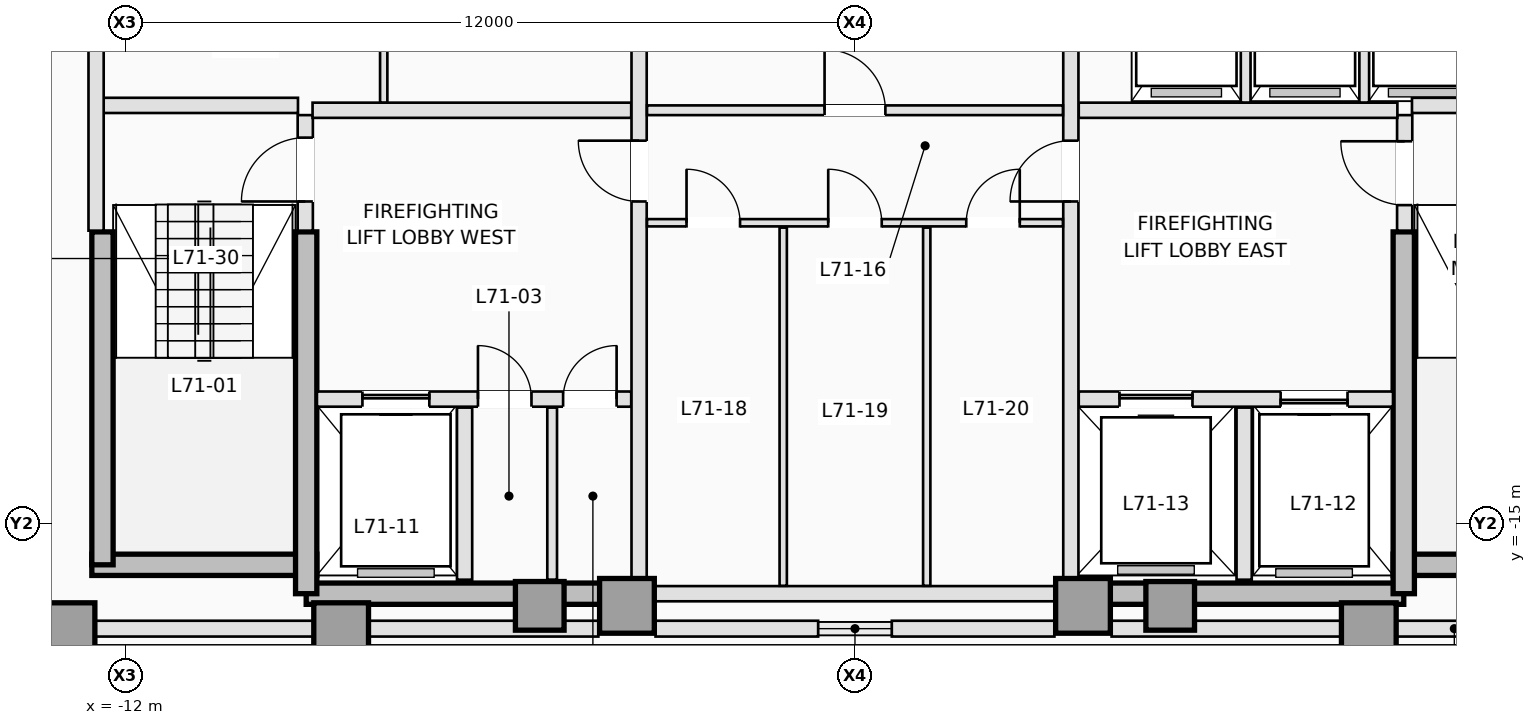
"""IFC4 building model, lengths in metres.
Left out: names, types, materials, properties, quantities, classifications, styles, units other than length and angle.
Written with IfcOpenShell. Run it as: python <this file> out.ifc"""

import sys

from ifc_helpers import new_model, si_unit, direction, frame, frame_2d, origin, origin_2d, place, context, subcontext, project, spatial, rectangle, extrude, element, fill, save


model = new_model("IFC4")
c1 = context("Model", 3, precision=1e-05, world=origin(), true_north=direction((0.0, 1.0)))
c2 = subcontext(c1, "Body", "Model", "MODEL_VIEW")
j1 = project(units=[si_unit("LENGTHUNIT", "METRE"), si_unit("PLANEANGLEUNIT", "RADIAN")], contexts=[c1])
p1 = place(None, origin())
s1 = spatial("IfcSite", under=j1, at=p1, CompositionType="ELEMENT")
p2 = place(p1, origin())
s2 = spatial("IfcBuilding", under=s1, at=p2, CompositionType="ELEMENT")
p3 = place(p2, frame((0.0, 0.0, 256.9)))
s3 = spatial("IfcBuildingStorey", under=s2, at=p3, CompositionType="ELEMENT", Elevation=256.9)
p4 = place(p3, frame((-12.55, -15.675, 0.0), z_axis=(0.0, 0.0, 1.0), x_axis=(1.0, 0.0, 0.0)))
e1 = element("IfcWall", 1, at=p4, inside=s3, PredefinedType="SHEAR", context=c2, shape_type="SweptSolid", body=[
    extrude(rectangle(XDim=3.7, YDim=0.35, at=frame_2d((1.85, 0.0))), origin(), (0.0, 0.0, 1.0), 3.5),
])
for number, where, z_axis, x_axis in (
    (2, (-9.025, -16.15, 0.0), (0.0, 0.0, 1.0), (1.0, 0.0, 0.0)),
    (3, (3.75, -16.15, 0.0), (0.0, 0.0, 1.0), (1.0, 0.0, 0.0)),
):
    element("IfcWall", number, at=place(p3, frame(where, z_axis=z_axis, x_axis=x_axis)), inside=s3, PredefinedType="SHEAR", context=c2, shape_type="SweptSolid", body=[
        extrude(rectangle(XDim=5.275, YDim=0.35, at=frame_2d((2.637, 0.0))), origin(), (0.0, 0.0, 1.0), 3.5),
    ])
p5 = place(p3, frame((8.85, -15.675, 0.0), z_axis=(0.0, 0.0, 1.0), x_axis=(1.0, 0.0, 0.0)))
e4 = element("IfcWall", 4, at=p5, inside=s3, PredefinedType="SHEAR", context=c2, shape_type="SweptSolid", body=[
    extrude(rectangle(XDim=3.7, YDim=0.35, at=frame_2d((1.85, 0.0))), origin(), (0.0, 0.0, 1.0), 3.5),
])
p6 = place(p3, frame((-12.375, -15.675, 0.0), z_axis=(0.0, 0.0, 1.0), x_axis=(0.0, 1.0, 0.0)))
e5 = element("IfcWall", 5, at=p6, inside=s3, PredefinedType="SHEAR", context=c2, shape_type="SweptSolid", body=[
    extrude(rectangle(XDim=5.475, YDim=0.35, at=frame_2d((2.738, 0.0))), origin(), (0.0, 0.0, 1.0), 3.5),
])
for number, where, z_axis, x_axis in (
    (6, (-9.025, -16.15, 0.0), (0.0, 0.0, 1.0), (0.0, 1.0, 0.0)),
    (7, (9.025, -16.15, 0.0), (0.0, 0.0, 1.0), (0.0, 1.0, 0.0)),
):
    element("IfcWall", number, at=place(p3, frame(where, z_axis=z_axis, x_axis=x_axis)), inside=s3, PredefinedType="SHEAR", context=c2, shape_type="SweptSolid", body=[
        extrude(rectangle(XDim=5.95, YDim=0.35, at=frame_2d((2.975, 0.0))), origin(), (0.0, 0.0, 1.0), 3.5),
    ])
for number, where, z_axis, x_axis in (
    (8, (-12.95, -16.75, 0.0), (0.0, 0.0, 1.0), (1.0, 0.0, 0.0)),
    (9, (-8.45, -16.75, 0.0), (0.0, 0.0, 1.0), (1.0, 0.0, 0.0)),
    (10, (-3.75, -16.35, 0.0), (0.0, 0.0, 1.0), (1.0, 0.0, 0.0)),
    (11, (3.75, -16.35, 0.0), (0.0, 0.0, 1.0), (1.0, 0.0, 0.0)),
    (12, (8.45, -16.75, 0.0), (0.0, 0.0, 1.0), (1.0, 0.0, 0.0)),
):
    element("IfcColumn", number, at=place(p3, frame(where, z_axis=z_axis, x_axis=x_axis)), inside=s3, PredefinedType="COLUMN", context=c2, shape_type="SweptSolid", body=[
        extrude(rectangle(XDim=0.9, YDim=0.9, at=origin_2d()), origin(), (0.0, 0.0, 1.0), 3.5),
    ])
for number, where, z_axis, x_axis in (
    (13, (-5.184, -16.35, 0.0), (0.0, 0.0, 1.0), (0.0, 1.0, 0.0)),
    (14, (5.184, -16.35, 0.0), (0.0, 0.0, 1.0), (0.0, 1.0, 0.0)),
):
    element("IfcColumn", number, at=place(p3, frame(where, z_axis=z_axis, x_axis=x_axis)), inside=s3, PredefinedType="COLUMN", context=c2, shape_type="SweptSolid", body=[
        extrude(rectangle(XDim=0.8, YDim=0.8, at=origin_2d()), origin(), (0.0, 0.0, 1.0), 3.5),
    ])
for number, where, z_axis, x_axis in (
    (15, (15.493, -16.725, 0.0), (0.0, 0.0, 1.0), (-1.0, 0.0, 0.0)),
    (16, (-4.22, -16.725, 0.0), (0.0, 0.0, 1.0), (-1.0, 0.0, 0.0)),
):
    element("IfcWall", number, at=place(p3, frame(where, z_axis=z_axis, x_axis=x_axis)), inside=s3, PredefinedType="STANDARD", context=c2, shape_type="SweptSolid", body=[
        extrude(rectangle(XDim=11.273, YDim=0.26, at=frame_2d((5.636, 0.0))), origin(), (0.0, 0.0, 1.0), 2.79),
    ])
for number, where, z_axis, x_axis in (
    (17, (3.28, -16.725, 0.0), (0.0, 0.0, 1.0), (-1.0, 0.0, 0.0)),
    (18, (-0.606, -16.725, 0.0), (0.0, 0.0, 1.0), (-1.0, 0.0, 0.0)),
):
    element("IfcWall", number, at=place(p3, frame(where, z_axis=z_axis, x_axis=x_axis)), inside=s3, PredefinedType="STANDARD", context=c2, shape_type="SweptSolid", body=[
        extrude(rectangle(XDim=2.674, YDim=0.26, at=frame_2d((1.337, 0.0))), origin(), (0.0, 0.0, 1.0), 3.25),
    ])
p7 = place(p3, frame((-9.04, -10.18, 0.0), z_axis=(0.0, 0.0, 1.0), x_axis=(0.0, 1.0, 0.0)))
e19 = element("IfcWall", 19, at=p7, inside=s3, PredefinedType="PARTITIONING", context=c2, shape_type="SweptSolid", body=[
    extrude(rectangle(XDim=1.9, YDim=0.25, at=frame_2d((0.95, 0.0))), origin(), (0.0, 0.0, 1.0), 3.25),
])
p8 = place(p7, frame((0.48, 0.0, 0.0)))
e20 = element("IfcOpeningElement", 20, at=p8, cuts=e19, PredefinedType="OPENING", context=c2, shape_type="SweptSolid", body=[
    extrude(rectangle(XDim=1.05, YDim=2.15, at=frame_2d((0.525, 1.075))), frame((0.0, 0.135, 0.0), z_axis=(0.0, -1.0, 0.0), x_axis=(1.0, 0.0, 0.0)), (0.0, 0.0, 1.0), 0.27),
])
p9 = place(p3, frame((9.04, -10.18, 0.0), z_axis=(0.0, 0.0, 1.0), x_axis=(0.0, 1.0, 0.0)))
e21 = element("IfcWall", 21, at=p9, inside=s3, PredefinedType="PARTITIONING", context=c2, shape_type="SweptSolid", body=[
    extrude(rectangle(XDim=1.9, YDim=0.25, at=frame_2d((0.95, 0.0))), origin(), (0.0, 0.0, 1.0), 3.25),
])
p10 = place(p9, frame((0.42, 0.0, 0.0)))
e22 = element("IfcOpeningElement", 22, at=p10, cuts=e21, PredefinedType="OPENING", context=c2, shape_type="SweptSolid", body=[
    extrude(rectangle(XDim=1.05, YDim=2.15, at=frame_2d((0.525, 1.075))), frame((0.0, 0.135, 0.0), z_axis=(0.0, -1.0, 0.0), x_axis=(1.0, 0.0, 0.0)), (0.0, 0.0, 1.0), 0.27),
])
for number, where, z_axis, x_axis in (
    (23, (-12.38, -8.12, 0.0), (0.0, 0.0, 1.0), (1.0, 0.0, 0.0)),
    (24, (9.16, -8.12, 0.0), (0.0, 0.0, 1.0), (1.0, 0.0, 0.0)),
):
    element("IfcWall", number, at=place(p3, frame(where, z_axis=z_axis, x_axis=x_axis)), inside=s3, PredefinedType="PARTITIONING", context=c2, shape_type="SweptSolid", body=[
        extrude(rectangle(XDim=3.22, YDim=0.25, at=frame_2d((1.61, 0.0))), origin(), (0.0, 0.0, 1.0), 3.25),
    ])
p11 = place(p3, frame((-12.48, -10.18, 0.0), z_axis=(0.0, 0.0, 1.0), x_axis=(0.0, 1.0, 0.0)))
e25 = element("IfcWall", 25, at=p11, inside=s3, PredefinedType="PARTITIONING", context=c2, shape_type="SweptSolid", body=[
    extrude(rectangle(XDim=4.84, YDim=0.25, at=frame_2d((2.42, 0.0))), origin(), (0.0, 0.0, 1.0), 3.25),
])
p12 = place(p3, frame((-8.848, -12.95, 0.0), z_axis=(0.0, 0.0, 1.0), x_axis=(1.0, 0.0, 0.0)))
e26 = element("IfcWall", 26, at=p12, inside=s3, PredefinedType="PARTITIONING", context=c2, shape_type="SweptSolid", body=[
    extrude(rectangle(XDim=5.168, YDim=0.25, at=frame_2d((2.584, 0.0))), origin(), (0.0, 0.0, 1.0), 3.25),
])
p13 = place(p12, frame((0.748, 0.0, 0.0)))
e27 = element("IfcOpeningElement", 27, at=p13, cuts=e26, PredefinedType="OPENING", context=c2, shape_type="SweptSolid", body=[
    extrude(rectangle(XDim=1.1, YDim=2.15, at=frame_2d((0.55, 1.075))), frame((0.0, 0.135, 0.0), z_axis=(0.0, -1.0, 0.0), x_axis=(1.0, 0.0, 0.0)), (0.0, 0.0, 1.0), 0.27),
])
p14 = place(p12, frame((2.648, 0.0, 0.0)))
e28 = element("IfcOpeningElement", 28, at=p14, cuts=e26, PredefinedType="OPENING", context=c2, shape_type="SweptSolid", body=[
    extrude(rectangle(XDim=0.88, YDim=2.1, at=frame_2d((0.44, 1.05))), frame((0.0, 0.135, 0.0), z_axis=(0.0, -1.0, 0.0), x_axis=(1.0, 0.0, 0.0)), (0.0, 0.0, 1.0), 0.27),
])
p15 = place(p12, frame((4.048, 0.0, 0.0)))
e29 = element("IfcOpeningElement", 29, at=p15, cuts=e26, PredefinedType="OPENING", context=c2, shape_type="SweptSolid", body=[
    extrude(rectangle(XDim=0.88, YDim=2.1, at=frame_2d((0.44, 1.05))), frame((0.0, 0.135, 0.0), z_axis=(0.0, -1.0, 0.0), x_axis=(1.0, 0.0, 0.0)), (0.0, 0.0, 1.0), 0.27),
])
p16 = place(p3, frame((3.68, -12.95, 0.0), z_axis=(0.0, 0.0, 1.0), x_axis=(1.0, 0.0, 0.0)))
e30 = element("IfcWall", 30, at=p16, inside=s3, PredefinedType="PARTITIONING", context=c2, shape_type="SweptSolid", body=[
    extrude(rectangle(XDim=5.168, YDim=0.25, at=frame_2d((2.584, 0.0))), origin(), (0.0, 0.0, 1.0), 3.25),
])
p17 = place(p16, frame((3.32, 0.0, 0.0)))
e31 = element("IfcOpeningElement", 31, at=p17, cuts=e30, PredefinedType="OPENING", context=c2, shape_type="SweptSolid", body=[
    extrude(rectangle(XDim=1.1, YDim=2.15, at=frame_2d((0.55, 1.075))), frame((0.0, 0.135, 0.0), z_axis=(0.0, -1.0, 0.0), x_axis=(1.0, 0.0, 0.0)), (0.0, 0.0, 1.0), 0.27),
])
p18 = place(p16, frame((0.67, 0.0, 0.0)))
e32 = element("IfcOpeningElement", 32, at=p18, cuts=e30, PredefinedType="OPENING", context=c2, shape_type="SweptSolid", body=[
    extrude(rectangle(XDim=1.2, YDim=2.15, at=frame_2d((0.6, 1.075))), frame((0.0, 0.135, 0.0), z_axis=(0.0, -1.0, 0.0), x_axis=(1.0, 0.0, 0.0)), (0.0, 0.0, 1.0), 0.27),
])
p19 = place(p3, frame((-6.42, -15.92, 0.0), z_axis=(0.0, 0.0, 1.0), x_axis=(0.0, 1.0, 0.0)))
e33 = element("IfcWall", 33, at=p19, inside=s3, PredefinedType="PARTITIONING", context=c2, shape_type="SweptSolid", body=[
    extrude(rectangle(XDim=2.83, YDim=0.25, at=frame_2d((1.415, 0.0))), origin(), (0.0, 0.0, 1.0), 3.25),
])
p20 = place(p3, frame((-4.98, -15.92, 0.0), z_axis=(0.0, 0.0, 1.0), x_axis=(0.0, 1.0, 0.0)))
e34 = element("IfcWall", 34, at=p20, inside=s3, PredefinedType="PARTITIONING", context=c2, shape_type="SweptSolid", body=[
    extrude(rectangle(XDim=2.83, YDim=0.16, at=frame_2d((1.415, 0.0))), origin(), (0.0, 0.0, 1.0), 3.25),
])
p21 = place(p3, frame((6.4, -15.92, 0.0), z_axis=(0.0, 0.0, 1.0), x_axis=(0.0, 1.0, 0.0)))
e35 = element("IfcWall", 35, at=p21, inside=s3, PredefinedType="PARTITIONING", context=c2, shape_type="SweptSolid", body=[
    extrude(rectangle(XDim=2.83, YDim=0.25, at=frame_2d((1.415, 0.0))), origin(), (0.0, 0.0, 1.0), 3.25),
])
for number, where, z_axis, x_axis in (
    (36, (-8.92, -8.2, 0.0), (0.0, 0.0, 1.0), (1.0, 0.0, 0.0)),
    (37, (3.68, -8.2, 0.0), (0.0, 0.0, 1.0), (1.0, 0.0, 0.0)),
):
    element("IfcWall", number, at=place(p3, frame(where, z_axis=z_axis, x_axis=x_axis)), inside=s3, PredefinedType="PARTITIONING", context=c2, shape_type="SweptSolid", body=[
        extrude(rectangle(XDim=5.24, YDim=0.25, at=frame_2d((2.62, 0.0))), origin(), (0.0, 0.0, 1.0), 3.25),
    ])
p22 = place(p3, frame((-3.55, -15.898, 0.0), z_axis=(0.0, 0.0, 1.0), x_axis=(0.0, 1.0, 0.0)))
e38 = element("IfcWall", 38, at=p22, inside=s3, PredefinedType="PARTITIONING", context=c2, shape_type="SweptSolid", body=[
    extrude(rectangle(XDim=10.558, YDim=0.25, at=frame_2d((5.279, 0.0))), origin(), (0.0, 0.0, 1.0), 3.25),
])
p23 = place(p22, frame((6.198, 0.0, 0.0)))
e39 = element("IfcOpeningElement", 39, at=p23, cuts=e38, PredefinedType="OPENING", context=c2, shape_type="SweptSolid", body=[
    extrude(rectangle(XDim=1.0, YDim=2.15, at=frame_2d((0.5, 1.075))), frame((0.0, 0.135, 0.0), z_axis=(0.0, -1.0, 0.0), x_axis=(1.0, 0.0, 0.0)), (0.0, 0.0, 1.0), 0.27),
])
p24 = place(p3, frame((3.55, -15.898, 0.0), z_axis=(0.0, 0.0, 1.0), x_axis=(0.0, 1.0, 0.0)))
e40 = element("IfcWall", 40, at=p24, inside=s3, PredefinedType="PARTITIONING", context=c2, shape_type="SweptSolid", body=[
    extrude(rectangle(XDim=10.558, YDim=0.25, at=frame_2d((5.279, 0.0))), origin(), (0.0, 0.0, 1.0), 3.25),
])
p25 = place(p24, frame((6.198, 0.0, 0.0)))
e41 = element("IfcOpeningElement", 41, at=p25, cuts=e40, PredefinedType="OPENING", context=c2, shape_type="SweptSolid", body=[
    extrude(rectangle(XDim=1.0, YDim=2.15, at=frame_2d((0.5, 1.075))), frame((0.0, 0.135, 0.0), z_axis=(0.0, -1.0, 0.0), x_axis=(1.0, 0.0, 0.0)), (0.0, 0.0, 1.0), 0.27),
])
p26 = place(p3, frame((-7.75, -8.073, 0.0), z_axis=(0.0, 0.0, 1.0), x_axis=(0.0, 1.0, 0.0)))
e42 = element("IfcWall", 42, at=p26, inside=s3, PredefinedType="PARTITIONING", context=c2, shape_type="SweptSolid", body=[
    extrude(rectangle(XDim=2.733, YDim=0.12, at=frame_2d((1.366, 0.0))), origin(), (0.0, 0.0, 1.0), 3.25),
])
for number, where, z_axis, x_axis in (
    (43, (6.425, -8.073, 0.0), (0.0, 0.0, 1.0), (0.0, 1.0, 0.0)),
    (44, (8.375, -8.073, 0.0), (0.0, 0.0, 1.0), (0.0, 1.0, 0.0)),
):
    element("IfcWall", number, at=place(p3, frame(where, z_axis=z_axis, x_axis=x_axis)), inside=s3, PredefinedType="PARTITIONING", context=c2, shape_type="SweptSolid", body=[
        extrude(rectangle(XDim=2.733, YDim=0.16, at=frame_2d((1.366, 0.0))), origin(), (0.0, 0.0, 1.0), 3.25),
    ])
p27 = place(p3, frame((-3.298, -16.15, 0.0), z_axis=(0.0, 0.0, 1.0), x_axis=(1.0, 0.0, 0.0)))
e45 = element("IfcWall", 45, at=p27, inside=s3, PredefinedType="PARTITIONING", context=c2, shape_type="SweptSolid", body=[
    extrude(rectangle(XDim=6.596, YDim=0.25, at=frame_2d((3.298, 0.0))), origin(), (0.0, 0.0, 1.0), 2.844),
])
p28 = place(p3, frame((-3.42, -8.2, 0.0), z_axis=(0.0, 0.0, 1.0), x_axis=(1.0, 0.0, 0.0)))
e46 = element("IfcWall", 46, at=p28, inside=s3, PredefinedType="PARTITIONING", context=c2, shape_type="SweptSolid", body=[
    extrude(rectangle(XDim=6.84, YDim=0.16, at=frame_2d((3.42, 0.0))), origin(), (0.0, 0.0, 1.0), 3.25),
])
p29 = place(p28, frame((2.92, 0.0, 0.0)))
e47 = element("IfcOpeningElement", 47, at=p29, cuts=e46, PredefinedType="OPENING", context=c2, shape_type="SweptSolid", body=[
    extrude(rectangle(XDim=1.0, YDim=2.15, at=frame_2d((0.5, 1.075))), frame((0.0, 0.09, 0.0), z_axis=(0.0, -1.0, 0.0), x_axis=(1.0, 0.0, 0.0)), (0.0, 0.0, 1.0), 0.18),
])
p30 = place(p3, frame((-3.42, -10.05, 0.0), z_axis=(0.0, 0.0, 1.0), x_axis=(1.0, 0.0, 0.0)))
e48 = element("IfcWall", 48, at=p30, inside=s3, PredefinedType="PARTITIONING", context=c2, shape_type="SweptSolid", body=[
    extrude(rectangle(XDim=6.84, YDim=0.12, at=frame_2d((3.42, 0.0))), origin(), (0.0, 0.0, 1.0), 3.25),
])
p31 = place(p30, frame((0.65, 0.0, 0.0)))
e49 = element("IfcOpeningElement", 49, at=p31, cuts=e48, PredefinedType="OPENING", context=c2, shape_type="SweptSolid", body=[
    extrude(rectangle(XDim=0.88, YDim=2.12, at=frame_2d((0.44, 1.06))), frame((0.0, 0.07, 0.0), z_axis=(0.0, -1.0, 0.0), x_axis=(1.0, 0.0, 0.0)), (0.0, 0.0, 1.0), 0.14),
])
p32 = place(p30, frame((2.98, 0.0, 0.0)))
e50 = element("IfcOpeningElement", 50, at=p32, cuts=e48, PredefinedType="OPENING", context=c2, shape_type="SweptSolid", body=[
    extrude(rectangle(XDim=0.88, YDim=2.12, at=frame_2d((0.44, 1.06))), frame((0.0, 0.07, 0.0), z_axis=(0.0, -1.0, 0.0), x_axis=(1.0, 0.0, 0.0)), (0.0, 0.0, 1.0), 0.14),
])
p33 = place(p30, frame((5.25, 0.0, 0.0)))
e51 = element("IfcOpeningElement", 51, at=p33, cuts=e48, PredefinedType="OPENING", context=c2, shape_type="SweptSolid", body=[
    extrude(rectangle(XDim=0.88, YDim=2.12, at=frame_2d((0.44, 1.06))), frame((0.0, 0.07, 0.0), z_axis=(0.0, -1.0, 0.0), x_axis=(1.0, 0.0, 0.0)), (0.0, 0.0, 1.0), 0.14),
])
for number, where, z_axis, x_axis in (
    (52, (-1.18, -16.02, 0.0), (0.0, 0.0, 1.0), (0.0, 1.0, 0.0)),
    (53, (1.18, -16.02, 0.0), (0.0, 0.0, 1.0), (0.0, 1.0, 0.0)),
):
    element("IfcWall", number, at=place(p3, frame(where, z_axis=z_axis, x_axis=x_axis)), inside=s3, PredefinedType="PARTITIONING", context=c2, shape_type="SweptSolid", body=[
        extrude(rectangle(XDim=5.89, YDim=0.12, at=frame_2d((2.945, 0.0))), origin(), (0.0, 0.0, 1.0), 3.25),
    ])
p34 = place(p13, origin())
e54 = element("IfcDoor", 54, at=p34, inside=s3, OperationType="SLIDING_TO_LEFT", PredefinedType="DOOR", context=c2, shape_type="SweptSolid", body=[
    extrude(rectangle(XDim=1.1, YDim=2.15, at=frame_2d((0.55, 1.075))), frame((0.0, 0.025, 0.0), z_axis=(0.0, -1.0, 0.0), x_axis=(1.0, 0.0, 0.0)), (0.0, 0.0, 1.0), 0.05),
])
fill(e27, e54)
p35 = place(p17, origin())
e55 = element("IfcDoor", 55, at=p35, inside=s3, OperationType="SLIDING_TO_RIGHT", PredefinedType="DOOR", context=c2, shape_type="SweptSolid", body=[
    extrude(rectangle(XDim=1.1, YDim=2.15, at=frame_2d((0.55, 1.075))), frame((0.0, 0.025, 0.0), z_axis=(0.0, -1.0, 0.0), x_axis=(1.0, 0.0, 0.0)), (0.0, 0.0, 1.0), 0.05),
])
fill(e31, e55)
p36 = place(p18, origin())
e56 = element("IfcDoor", 56, at=p36, inside=s3, OperationType="SLIDING_TO_LEFT", PredefinedType="DOOR", context=c2, shape_type="SweptSolid", body=[
    extrude(rectangle(XDim=1.2, YDim=2.15, at=frame_2d((0.6, 1.075))), frame((0.0, 0.025, 0.0), z_axis=(0.0, -1.0, 0.0), x_axis=(1.0, 0.0, 0.0)), (0.0, 0.0, 1.0), 0.05),
])
fill(e32, e56)
p37 = place(p8, origin())
e57 = element("IfcDoor", 57, at=p37, inside=s3, OperationType="SINGLE_SWING_LEFT", PredefinedType="DOOR", context=c2, shape_type="SweptSolid", body=[
    extrude(rectangle(XDim=1.05, YDim=2.15, at=frame_2d((0.525, 1.075))), frame((0.0, 0.025, 0.0), z_axis=(0.0, -1.0, 0.0), x_axis=(1.0, 0.0, 0.0)), (0.0, 0.0, 1.0), 0.05),
])
fill(e20, e57)
p38 = place(p10, origin())
e58 = element("IfcDoor", 58, at=p38, inside=s3, OperationType="SINGLE_SWING_RIGHT", PredefinedType="DOOR", context=c2, shape_type="SweptSolid", body=[
    extrude(rectangle(XDim=1.05, YDim=2.15, at=frame_2d((0.525, 1.075))), frame((0.0, 0.025, 0.0), z_axis=(0.0, -1.0, 0.0), x_axis=(1.0, 0.0, 0.0)), (0.0, 0.0, 1.0), 0.05),
])
fill(e22, e58)
p39 = place(p14, origin())
e59 = element("IfcDoor", 59, at=p39, inside=s3, OperationType="SINGLE_SWING_LEFT", PredefinedType="TRAPDOOR", context=c2, shape_type="SweptSolid", body=[
    extrude(rectangle(XDim=0.88, YDim=2.1, at=frame_2d((0.44, 1.05))), frame((0.0, 0.025, 0.0), z_axis=(0.0, -1.0, 0.0), x_axis=(1.0, 0.0, 0.0)), (0.0, 0.0, 1.0), 0.05),
])
fill(e28, e59)
p40 = place(p15, origin())
e60 = element("IfcDoor", 60, at=p40, inside=s3, OperationType="SINGLE_SWING_RIGHT", PredefinedType="TRAPDOOR", context=c2, shape_type="SweptSolid", body=[
    extrude(rectangle(XDim=0.88, YDim=2.1, at=frame_2d((0.44, 1.05))), frame((0.0, 0.025, 0.0), z_axis=(0.0, -1.0, 0.0), x_axis=(1.0, 0.0, 0.0)), (0.0, 0.0, 1.0), 0.05),
])
fill(e29, e60)
p41 = place(p23, origin())
e61 = element("IfcDoor", 61, at=p41, inside=s3, OperationType="SINGLE_SWING_RIGHT", PredefinedType="DOOR", context=c2, shape_type="SweptSolid", body=[
    extrude(rectangle(XDim=1.0, YDim=2.15, at=frame_2d((0.5, 1.075))), frame((0.0, 0.025, 0.0), z_axis=(0.0, -1.0, 0.0), x_axis=(1.0, 0.0, 0.0)), (0.0, 0.0, 1.0), 0.05),
])
fill(e39, e61)
p42 = place(p25, origin())
e62 = element("IfcDoor", 62, at=p42, inside=s3, OperationType="SINGLE_SWING_LEFT", PredefinedType="DOOR", context=c2, shape_type="SweptSolid", body=[
    extrude(rectangle(XDim=1.0, YDim=2.15, at=frame_2d((0.5, 1.075))), frame((0.0, 0.025, 0.0), z_axis=(0.0, -1.0, 0.0), x_axis=(1.0, 0.0, 0.0)), (0.0, 0.0, 1.0), 0.05),
])
fill(e41, e62)
p43 = place(p29, origin())
e63 = element("IfcDoor", 63, at=p43, inside=s3, OperationType="SINGLE_SWING_LEFT", PredefinedType="DOOR", context=c2, shape_type="SweptSolid", body=[
    extrude(rectangle(XDim=1.0, YDim=2.15, at=frame_2d((0.5, 1.075))), frame((0.0, 0.025, 0.0), z_axis=(0.0, -1.0, 0.0), x_axis=(1.0, 0.0, 0.0)), (0.0, 0.0, 1.0), 0.05),
])
fill(e47, e63)
p44 = place(p31, origin())
e64 = element("IfcDoor", 64, at=p44, inside=s3, OperationType="SINGLE_SWING_LEFT", PredefinedType="DOOR", context=c2, shape_type="SweptSolid", body=[
    extrude(rectangle(XDim=0.88, YDim=2.12, at=frame_2d((0.44, 1.06))), frame((0.0, 0.025, 0.0), z_axis=(0.0, -1.0, 0.0), x_axis=(1.0, 0.0, 0.0)), (0.0, 0.0, 1.0), 0.05),
])
fill(e49, e64)
p45 = place(p32, origin())
e65 = element("IfcDoor", 65, at=p45, inside=s3, OperationType="SINGLE_SWING_LEFT", PredefinedType="DOOR", context=c2, shape_type="SweptSolid", body=[
    extrude(rectangle(XDim=0.88, YDim=2.12, at=frame_2d((0.44, 1.06))), frame((0.0, 0.025, 0.0), z_axis=(0.0, -1.0, 0.0), x_axis=(1.0, 0.0, 0.0)), (0.0, 0.0, 1.0), 0.05),
])
fill(e50, e65)
p46 = place(p33, origin())
e66 = element("IfcDoor", 66, at=p46, inside=s3, OperationType="SINGLE_SWING_RIGHT", PredefinedType="DOOR", context=c2, shape_type="SweptSolid", body=[
    extrude(rectangle(XDim=0.88, YDim=2.12, at=frame_2d((0.44, 1.06))), frame((0.0, 0.025, 0.0), z_axis=(0.0, -1.0, 0.0), x_axis=(1.0, 0.0, 0.0)), (0.0, 0.0, 1.0), 0.05),
])
fill(e51, e66)
save(model, sys.argv[1])
